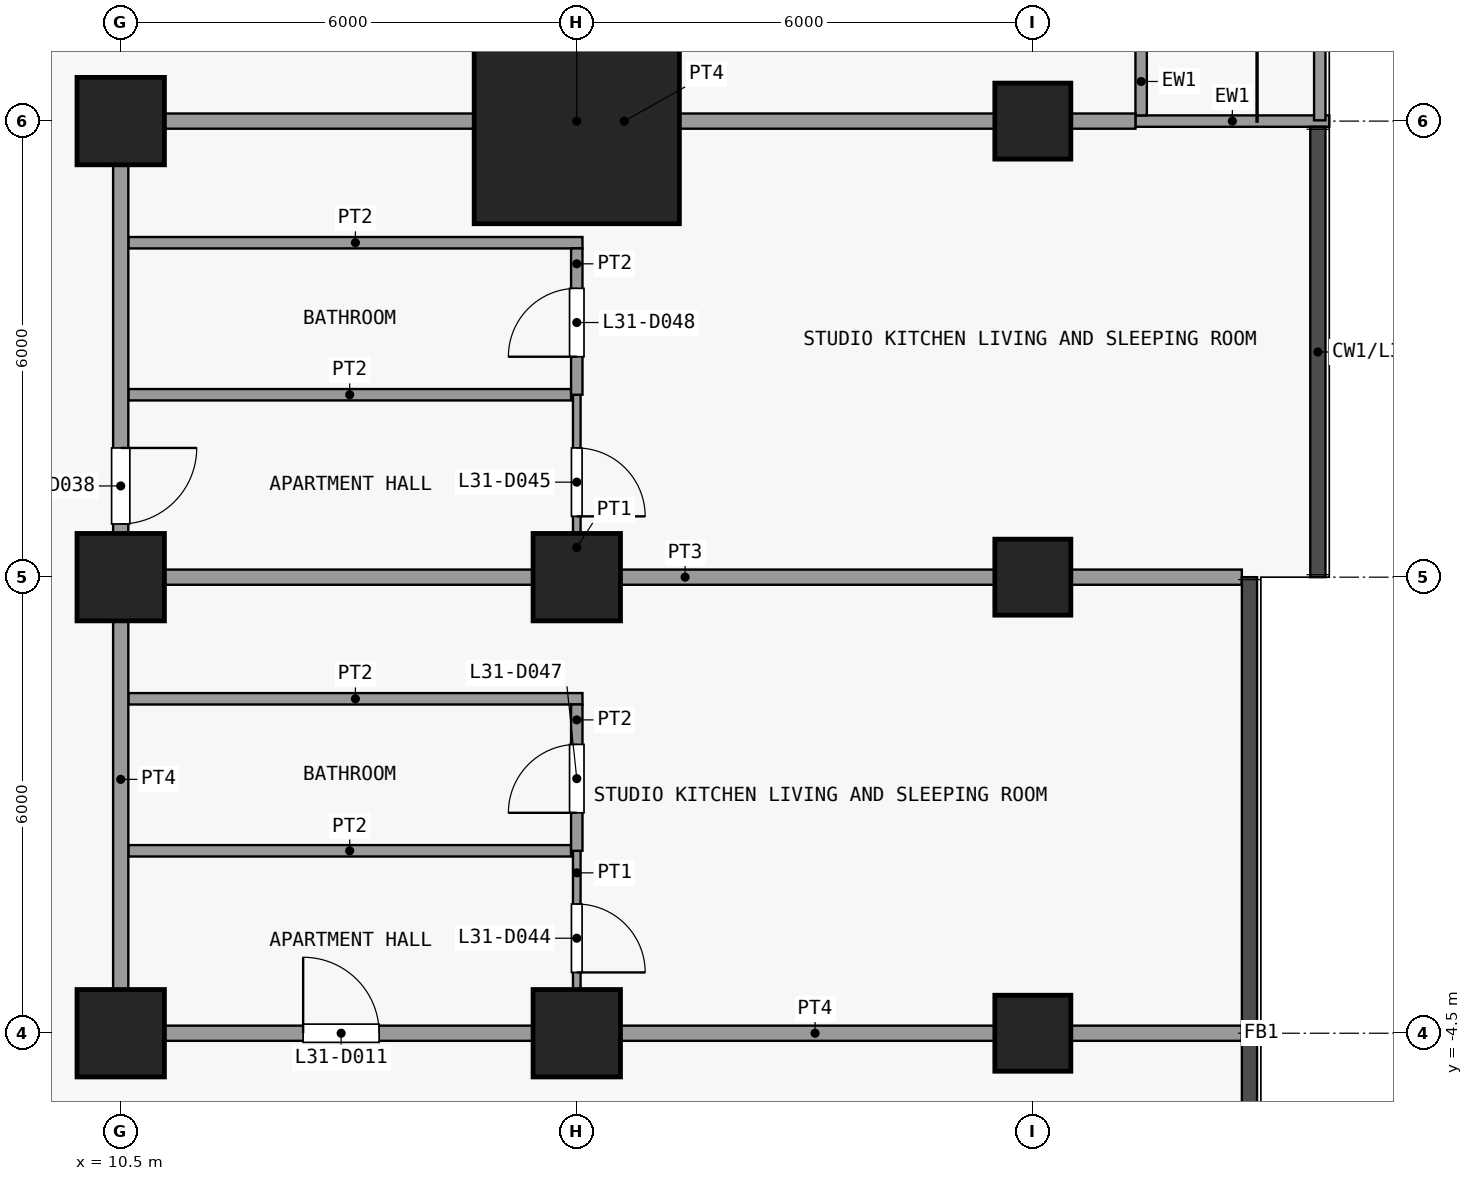
"""IFC4 building model, lengths in metres.
Left out: names, types, materials, properties, quantities, classifications, styles, units other than length and angle.
Written with IfcOpenShell. Run it as: python <this file> out.ifc"""

import sys

from ifc_helpers import new_model, si_unit, direction, frame, frame_2d, origin, origin_2d, place, context, subcontext, project, spatial, rectangle, extrude, element, fill, save


model = new_model("IFC4")
c1 = context("Model", 3, precision=1e-05, world=origin(), true_north=direction((0.0, 1.0)))
c2 = subcontext(c1, "Body", "Model", "MODEL_VIEW")
j1 = project(units=[si_unit("LENGTHUNIT", "METRE"), si_unit("PLANEANGLEUNIT", "RADIAN")], contexts=[c1])
p1 = place(None, origin())
s1 = spatial("IfcSite", under=j1, at=p1, CompositionType="ELEMENT")
p2 = place(p1, origin())
s2 = spatial("IfcBuilding", under=s1, at=p2, CompositionType="ELEMENT")
p3 = place(p2, frame((0.0, 0.0, 124.3)))
s3 = spatial("IfcBuildingStorey", under=s2, at=p3, CompositionType="ELEMENT", Elevation=124.3)
for number, where, z_axis, x_axis in (
    (1, (10.5, -4.5, 0.0), (0.0, 0.0, 1.0), (1.0, 0.0, 0.0)),
    (2, (10.5, 1.5, 0.0), (0.0, 0.0, 1.0), (1.0, 0.0, 0.0)),
    (3, (10.5, 7.5, 0.0), (0.0, 0.0, 1.0), (1.0, 0.0, 0.0)),
    (4, (16.5, -4.5, 0.0), (0.0, 0.0, 1.0), (1.0, 0.0, 0.0)),
    (5, (16.5, 1.5, 0.0), (0.0, 0.0, 1.0), (1.0, 0.0, 0.0)),
):
    element("IfcColumn", number, at=place(p3, frame(where, z_axis=z_axis, x_axis=x_axis)), inside=s3, PredefinedType="COLUMN", context=c2, shape_type="SweptSolid", body=[
        extrude(rectangle(XDim=1.15, YDim=1.15, at=origin_2d()), origin(), (0.0, 0.0, 1.0), 3.6),
    ])
p4 = place(p3, frame((16.5, 7.5, 0.0), z_axis=(0.0, 0.0, 1.0), x_axis=(1.0, 0.0, 0.0)))
e6 = element("IfcColumn", 6, at=p4, inside=s3, PredefinedType="COLUMN", context=c2, shape_type="SweptSolid", body=[
    extrude(rectangle(XDim=2.7, YDim=2.7, at=origin_2d()), origin(), (0.0, 0.0, 1.0), 3.6),
])
for number, where, z_axis, x_axis in (
    (7, (22.5, -4.5, 0.0), (0.0, 0.0, 1.0), (1.0, 0.0, 0.0)),
    (8, (22.5, 1.5, 0.0), (0.0, 0.0, 1.0), (1.0, 0.0, 0.0)),
    (9, (22.5, 7.5, 0.0), (0.0, 0.0, 1.0), (1.0, 0.0, 0.0)),
):
    element("IfcColumn", number, at=place(p3, frame(where, z_axis=z_axis, x_axis=x_axis)), inside=s3, PredefinedType="COLUMN", context=c2, shape_type="SweptSolid", body=[
        extrude(rectangle(XDim=1.0, YDim=1.0, at=origin_2d()), origin(), (0.0, 0.0, 1.0), 3.6),
    ])
p5 = place(p3, frame((23.85, 7.5, 0.0), z_axis=(0.0, 0.0, 1.0), x_axis=(1.0, 0.0, 0.0)))
e10 = element("IfcWall", 10, at=p5, inside=s3, PredefinedType="SOLIDWALL", context=c2, shape_type="SweptSolid", body=[
    extrude(rectangle(XDim=2.55, YDim=0.15, at=frame_2d((1.275, 0.0))), origin(), (0.0, 0.0, 1.0), 3.3),
])
p6 = place(p3, frame((23.925, 13.425, 0.0), z_axis=(0.0, 0.0, 1.0), x_axis=(0.0, -1.0, 0.0)))
e11 = element("IfcWall", 11, at=p6, inside=s3, PredefinedType="SOLIDWALL", context=c2, shape_type="SweptSolid", body=[
    extrude(rectangle(XDim=5.85, YDim=0.15, at=frame_2d((2.925, 0.0))), origin(), (0.0, 0.0, 1.0), 3.3),
])
p7 = place(p6, frame((0.825, 0.0, 0.0)))
e12 = element("IfcOpeningElement", 12, at=p7, cuts=e11, PredefinedType="OPENING", context=c2, shape_type="SweptSolid", body=[
    extrude(rectangle(XDim=1.2, YDim=2.4, at=frame_2d((0.6, 1.2))), frame((0.0, 0.085, 0.0), z_axis=(0.0, -1.0, 0.0), x_axis=(1.0, 0.0, 0.0)), (0.0, 0.0, 1.0), 0.17),
])
p8 = place(p6, frame((3.038, 0.0, 0.9)))
e13 = element("IfcOpeningElement", 13, at=p8, cuts=e11, PredefinedType="OPENING", context=c2, shape_type="SweptSolid", body=[
    extrude(rectangle(XDim=1.8, YDim=2.1, at=frame_2d((0.9, 1.05))), frame((0.0, 0.085, 0.0), z_axis=(0.0, -1.0, 0.0), x_axis=(1.0, 0.0, 0.0)), (0.0, 0.0, 1.0), 0.17),
])
p9 = place(p3, frame((26.275, 13.3, 0.0), z_axis=(0.0, 0.0, 1.0), x_axis=(0.0, -1.0, 0.0)))
e14 = element("IfcWall", 14, at=p9, inside=s3, PredefinedType="PARAPET", context=c2, shape_type="SweptSolid", body=[
    extrude(rectangle(XDim=5.79, YDim=0.15, at=frame_2d((2.895, 0.0))), origin(), (0.0, 0.0, 1.0), 1.15),
])
p10 = place(p3, frame((10.4, -4.5, 0.0), z_axis=(0.0, 0.0, 1.0), x_axis=(1.0, 0.0, 0.0)))
e15 = element("IfcWall", 15, at=p10, inside=s3, PredefinedType="PARTITIONING", context=c2, shape_type="SweptSolid", body=[
    extrude(rectangle(XDim=14.85, YDim=0.2, at=frame_2d((7.425, 0.0))), origin(), (0.0, 0.0, 1.0), 3.3),
])
p11 = place(p10, frame((2.5, 0.0, 0.0)))
e16 = element("IfcOpeningElement", 16, at=p11, cuts=e15, PredefinedType="OPENING", context=c2, shape_type="SweptSolid", body=[
    extrude(rectangle(XDim=1.0, YDim=2.1, at=frame_2d((0.5, 1.05))), frame((0.0, 0.11, 0.0), z_axis=(0.0, -1.0, 0.0), x_axis=(1.0, 0.0, 0.0)), (0.0, 0.0, 1.0), 0.22),
])
p12 = place(p3, frame((10.6, -2.1, 0.0), z_axis=(0.0, 0.0, 1.0), x_axis=(1.0, 0.0, 0.0)))
e17 = element("IfcWall", 17, at=p12, inside=s3, PredefinedType="PARTITIONING", context=c2, shape_type="SweptSolid", body=[
    extrude(rectangle(XDim=5.825, YDim=0.15, at=frame_2d((2.913, 0.0))), origin(), (0.0, 0.0, 1.0), 3.3),
])
p13 = place(p3, frame((10.6, -0.1, 0.0), z_axis=(0.0, 0.0, 1.0), x_axis=(1.0, 0.0, 0.0)))
e18 = element("IfcWall", 18, at=p13, inside=s3, PredefinedType="PARTITIONING", context=c2, shape_type="SweptSolid", body=[
    extrude(rectangle(XDim=5.975, YDim=0.15, at=frame_2d((2.987, 0.0))), origin(), (0.0, 0.0, 1.0), 3.3),
])
p14 = place(p3, frame((10.6, 1.5, 0.0), z_axis=(0.0, 0.0, 1.0), x_axis=(1.0, 0.0, 0.0)))
e19 = element("IfcWall", 19, at=p14, inside=s3, PredefinedType="PARTITIONING", context=c2, shape_type="SweptSolid", body=[
    extrude(rectangle(XDim=14.65, YDim=0.2, at=frame_2d((7.325, 0.0))), origin(), (0.0, 0.0, 1.0), 3.3),
])
p15 = place(p3, frame((10.6, 3.9, 0.0), z_axis=(0.0, 0.0, 1.0), x_axis=(1.0, 0.0, 0.0)))
e20 = element("IfcWall", 20, at=p15, inside=s3, PredefinedType="PARTITIONING", context=c2, shape_type="SweptSolid", body=[
    extrude(rectangle(XDim=5.825, YDim=0.15, at=frame_2d((2.913, 0.0))), origin(), (0.0, 0.0, 1.0), 3.3),
])
p16 = place(p3, frame((10.6, 5.9, 0.0), z_axis=(0.0, 0.0, 1.0), x_axis=(1.0, 0.0, 0.0)))
e21 = element("IfcWall", 21, at=p16, inside=s3, PredefinedType="PARTITIONING", context=c2, shape_type="SweptSolid", body=[
    extrude(rectangle(XDim=5.975, YDim=0.15, at=frame_2d((2.987, 0.0))), origin(), (0.0, 0.0, 1.0), 3.3),
])
p17 = place(p3, frame((10.4, 7.5, 0.0), z_axis=(0.0, 0.0, 1.0), x_axis=(1.0, 0.0, 0.0)))
e22 = element("IfcWall", 22, at=p17, inside=s3, PredefinedType="PARTITIONING", context=c2, shape_type="SweptSolid", body=[
    extrude(rectangle(XDim=13.45, YDim=0.2, at=frame_2d((6.725, 0.0))), origin(), (0.0, 0.0, 1.0), 3.3),
])
p18 = place(p3, frame((10.5, -4.4, 0.0), z_axis=(0.0, 0.0, 1.0), x_axis=(0.0, 1.0, 0.0)))
e23 = element("IfcWall", 23, at=p18, inside=s3, PredefinedType="PARTITIONING", context=c2, shape_type="SweptSolid", body=[
    extrude(rectangle(XDim=11.8, YDim=0.2, at=frame_2d((5.9, 0.0))), origin(), (0.0, 0.0, 1.0), 3.3),
])
p19 = place(p18, frame((6.6, 0.0, 0.0)))
e24 = element("IfcOpeningElement", 24, at=p19, cuts=e23, PredefinedType="OPENING", context=c2, shape_type="SweptSolid", body=[
    extrude(rectangle(XDim=1.0, YDim=2.1, at=frame_2d((0.5, 1.05))), frame((0.0, 0.11, 0.0), z_axis=(0.0, -1.0, 0.0), x_axis=(1.0, 0.0, 0.0)), (0.0, 0.0, 1.0), 0.22),
])
p20 = place(p3, frame((16.5, -4.4, 0.0), z_axis=(0.0, 0.0, 1.0), x_axis=(0.0, 1.0, 0.0)))
e25 = element("IfcWall", 25, at=p20, inside=s3, PredefinedType="PARTITIONING", context=c2, shape_type="SweptSolid", body=[
    extrude(rectangle(XDim=2.3, YDim=0.1, at=frame_2d((1.15, 0.0))), origin(), (0.0, 0.0, 1.0), 3.3),
])
p21 = place(p20, frame((0.7, 0.0, 0.0)))
e26 = element("IfcOpeningElement", 26, at=p21, cuts=e25, PredefinedType="OPENING", context=c2, shape_type="SweptSolid", body=[
    extrude(rectangle(XDim=0.9, YDim=2.1, at=frame_2d((0.45, 1.05))), frame((0.0, 0.06, 0.0), z_axis=(0.0, -1.0, 0.0), x_axis=(1.0, 0.0, 0.0)), (0.0, 0.0, 1.0), 0.12),
])
p22 = place(p3, frame((16.5, 1.6, 0.0), z_axis=(0.0, 0.0, 1.0), x_axis=(0.0, 1.0, 0.0)))
e27 = element("IfcWall", 27, at=p22, inside=s3, PredefinedType="PARTITIONING", context=c2, shape_type="SweptSolid", body=[
    extrude(rectangle(XDim=2.3, YDim=0.1, at=frame_2d((1.15, 0.0))), origin(), (0.0, 0.0, 1.0), 3.3),
])
p23 = place(p22, frame((0.7, 0.0, 0.0)))
e28 = element("IfcOpeningElement", 28, at=p23, cuts=e27, PredefinedType="OPENING", context=c2, shape_type="SweptSolid", body=[
    extrude(rectangle(XDim=0.9, YDim=2.1, at=frame_2d((0.45, 1.05))), frame((0.0, 0.06, 0.0), z_axis=(0.0, -1.0, 0.0), x_axis=(1.0, 0.0, 0.0)), (0.0, 0.0, 1.0), 0.12),
])
p24 = place(p3, frame((16.5, -2.1, 0.0), z_axis=(0.0, 0.0, 1.0), x_axis=(0.0, 1.0, 0.0)))
e29 = element("IfcWall", 29, at=p24, inside=s3, PredefinedType="PARTITIONING", context=c2, shape_type="SweptSolid", body=[
    extrude(rectangle(XDim=1.925, YDim=0.15, at=frame_2d((0.962, 0.0))), origin(), (0.0, 0.0, 1.0), 3.3),
])
p25 = place(p24, frame((0.5, 0.0, 0.0)))
e30 = element("IfcOpeningElement", 30, at=p25, cuts=e29, PredefinedType="OPENING", context=c2, shape_type="SweptSolid", body=[
    extrude(rectangle(XDim=0.9, YDim=2.1, at=frame_2d((0.45, 1.05))), frame((0.0, 0.085, 0.0), z_axis=(0.0, -1.0, 0.0), x_axis=(1.0, 0.0, 0.0)), (0.0, 0.0, 1.0), 0.17),
])
p26 = place(p3, frame((16.5, 3.9, 0.0), z_axis=(0.0, 0.0, 1.0), x_axis=(0.0, 1.0, 0.0)))
e31 = element("IfcWall", 31, at=p26, inside=s3, PredefinedType="PARTITIONING", context=c2, shape_type="SweptSolid", body=[
    extrude(rectangle(XDim=1.925, YDim=0.15, at=frame_2d((0.962, 0.0))), origin(), (0.0, 0.0, 1.0), 3.3),
])
p27 = place(p26, frame((0.5, 0.0, 0.0)))
e32 = element("IfcOpeningElement", 32, at=p27, cuts=e31, PredefinedType="OPENING", context=c2, shape_type="SweptSolid", body=[
    extrude(rectangle(XDim=0.9, YDim=2.1, at=frame_2d((0.45, 1.05))), frame((0.0, 0.085, 0.0), z_axis=(0.0, -1.0, 0.0), x_axis=(1.0, 0.0, 0.0)), (0.0, 0.0, 1.0), 0.17),
])
p28 = place(p11, origin())
e33 = element("IfcDoor", 33, at=p28, inside=s3, OperationType="SINGLE_SWING_RIGHT", PredefinedType="DOOR", context=c2, shape_type="SweptSolid", body=[
    extrude(rectangle(XDim=1.0, YDim=2.1, at=frame_2d((0.5, 1.05))), frame((0.0, 0.025, 0.0), z_axis=(0.0, -1.0, 0.0), x_axis=(1.0, 0.0, 0.0)), (0.0, 0.0, 1.0), 0.05),
])
fill(e16, e33)
p29 = place(p19, origin())
e34 = element("IfcDoor", 34, at=p29, inside=s3, OperationType="SINGLE_SWING_RIGHT", PredefinedType="DOOR", context=c2, shape_type="SweptSolid", body=[
    extrude(rectangle(XDim=1.0, YDim=2.1, at=frame_2d((0.5, 1.05))), frame((0.0, 0.025, 0.0), z_axis=(0.0, -1.0, 0.0), x_axis=(1.0, 0.0, 0.0)), (0.0, 0.0, 1.0), 0.05),
])
fill(e24, e34)
p30 = place(p21, origin())
e35 = element("IfcDoor", 35, at=p30, inside=s3, OperationType="SINGLE_SWING_LEFT", PredefinedType="DOOR", context=c2, shape_type="SweptSolid", body=[
    extrude(rectangle(XDim=0.9, YDim=2.1, at=frame_2d((0.45, 1.05))), frame((0.0, 0.025, 0.0), z_axis=(0.0, -1.0, 0.0), x_axis=(1.0, 0.0, 0.0)), (0.0, 0.0, 1.0), 0.05),
])
fill(e26, e35)
p31 = place(p23, origin())
e36 = element("IfcDoor", 36, at=p31, inside=s3, OperationType="SINGLE_SWING_LEFT", PredefinedType="DOOR", context=c2, shape_type="SweptSolid", body=[
    extrude(rectangle(XDim=0.9, YDim=2.1, at=frame_2d((0.45, 1.05))), frame((0.0, 0.025, 0.0), z_axis=(0.0, -1.0, 0.0), x_axis=(1.0, 0.0, 0.0)), (0.0, 0.0, 1.0), 0.05),
])
fill(e28, e36)
p32 = place(p25, origin())
e37 = element("IfcDoor", 37, at=p32, inside=s3, OperationType="SINGLE_SWING_RIGHT", PredefinedType="DOOR", context=c2, shape_type="SweptSolid", body=[
    extrude(rectangle(XDim=0.9, YDim=2.1, at=frame_2d((0.45, 1.05))), frame((0.0, 0.025, 0.0), z_axis=(0.0, -1.0, 0.0), x_axis=(1.0, 0.0, 0.0)), (0.0, 0.0, 1.0), 0.05),
])
fill(e30, e37)
p33 = place(p27, origin())
e38 = element("IfcDoor", 38, at=p33, inside=s3, OperationType="SINGLE_SWING_RIGHT", PredefinedType="DOOR", context=c2, shape_type="SweptSolid", body=[
    extrude(rectangle(XDim=0.9, YDim=2.1, at=frame_2d((0.45, 1.05))), frame((0.0, 0.025, 0.0), z_axis=(0.0, -1.0, 0.0), x_axis=(1.0, 0.0, 0.0)), (0.0, 0.0, 1.0), 0.05),
])
fill(e32, e38)
save(model, sys.argv[1])
